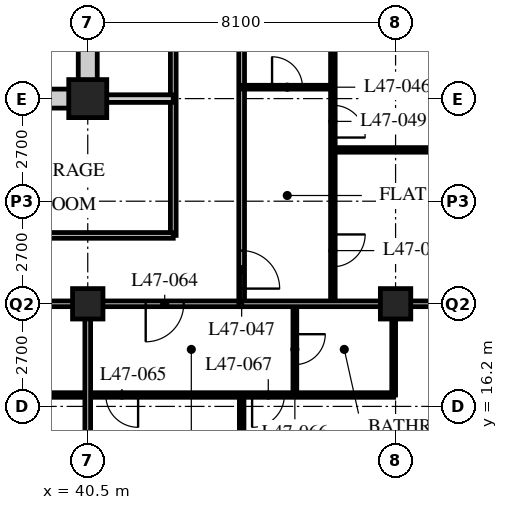
"""IFC4 building model, lengths in metres.
Left out: names, types, materials, properties, quantities, classifications, styles, units other than length and angle.
Written with IfcOpenShell. Run it as: python <this file> out.ifc"""

import sys

from ifc_helpers import new_model, si_unit, direction, frame, frame_2d, origin, origin_2d, place, context, subcontext, project, spatial, rectangle, hollow_rectangle, extrude, element, fill, save


model = new_model("IFC4")
c1 = context("Model", 3, precision=1e-05, world=origin(), true_north=direction((0.0, 1.0)))
c2 = subcontext(c1, "Body", "Model", "MODEL_VIEW")
j1 = project(units=[si_unit("LENGTHUNIT", "METRE"), si_unit("PLANEANGLEUNIT", "RADIAN")], contexts=[c1])
p1 = place(None, origin())
s1 = spatial("IfcSite", under=j1, at=p1, CompositionType="ELEMENT")
p2 = place(p1, origin())
s2 = spatial("IfcBuilding", under=s1, at=p2, CompositionType="ELEMENT")
p3 = place(p2, frame((0.0, 0.0, 184.8)))
s3 = spatial("IfcBuildingStorey", under=s2, at=p3, CompositionType="ELEMENT", Elevation=184.8)
p4 = place(p3, frame((40.5, 18.9, 0.0), z_axis=(0.0, 0.0, 1.0), x_axis=(1.0, 0.0, 0.0)))
e1 = element("IfcColumn", 1, at=p4, inside=s3, PredefinedType="COLUMN", context=c2, shape_type="SweptSolid", body=[
    extrude(hollow_rectangle(XDim=0.8, YDim=0.8, WallThickness=0.08, at=origin_2d()), origin(), (0.0, 0.0, 1.0), 3.6),
])
p5 = place(p3, frame((40.5, 24.3, 0.0), z_axis=(0.0, 0.0, 1.0), x_axis=(1.0, 0.0, 0.0)))
e2 = element("IfcColumn", 2, at=p5, inside=s3, PredefinedType="COLUMN", context=c2, shape_type="SweptSolid", body=[
    extrude(hollow_rectangle(XDim=1.0, YDim=1.0, WallThickness=0.1, at=origin_2d()), origin(), (0.0, 0.0, 1.0), 3.6),
])
p6 = place(p3, frame((48.6, 18.9, 0.0), z_axis=(0.0, 0.0, 1.0), x_axis=(1.0, 0.0, 0.0)))
e3 = element("IfcColumn", 3, at=p6, inside=s3, PredefinedType="COLUMN", context=c2, shape_type="SweptSolid", body=[
    extrude(hollow_rectangle(XDim=0.8, YDim=0.8, WallThickness=0.08, at=origin_2d()), origin(), (0.0, 0.0, 1.0), 3.6),
])
p7 = place(p3, frame((12.15, 18.9, 0.0), z_axis=(0.0, 0.0, 1.0), x_axis=(1.0, 0.0, 0.0)))
e4 = element("IfcWall", 4, at=p7, inside=s3, PredefinedType="PARTITIONING", context=c2, shape_type="SweptSolid", body=[
    extrude(rectangle(XDim=32.4, YDim=0.15, at=frame_2d((16.2, 0.0))), origin(), (0.0, 0.0, 1.0), 2.778),
])
p8 = place(p7, frame((4.95, 0.0, 0.0)))
e5 = element("IfcOpeningElement", 5, at=p8, cuts=e4, PredefinedType="OPENING", context=c2, shape_type="SweptSolid", body=[
    extrude(rectangle(XDim=1.0, YDim=2.1, at=frame_2d((0.5, 1.05))), frame((0.0, 0.085, 0.0), z_axis=(0.0, -1.0, 0.0), x_axis=(1.0, 0.0, 0.0)), (0.0, 0.0, 1.0), 0.17),
])
p9 = place(p7, frame((13.05, 0.0, 0.0)))
e6 = element("IfcOpeningElement", 6, at=p9, cuts=e4, PredefinedType="OPENING", context=c2, shape_type="SweptSolid", body=[
    extrude(rectangle(XDim=1.0, YDim=2.1, at=frame_2d((0.5, 1.05))), frame((0.0, 0.085, 0.0), z_axis=(0.0, -1.0, 0.0), x_axis=(1.0, 0.0, 0.0)), (0.0, 0.0, 1.0), 0.17),
])
p10 = place(p7, frame((21.15, 0.0, 0.0)))
e7 = element("IfcOpeningElement", 7, at=p10, cuts=e4, PredefinedType="OPENING", context=c2, shape_type="SweptSolid", body=[
    extrude(rectangle(XDim=1.0, YDim=2.1, at=frame_2d((0.5, 1.05))), frame((0.0, 0.085, 0.0), z_axis=(0.0, -1.0, 0.0), x_axis=(1.0, 0.0, 0.0)), (0.0, 0.0, 1.0), 0.17),
])
p11 = place(p7, frame((1.525, 0.0, 0.0)))
e8 = element("IfcOpeningElement", 8, at=p11, cuts=e4, PredefinedType="OPENING", context=c2, shape_type="SweptSolid", body=[
    extrude(rectangle(XDim=1.0, YDim=2.1, at=frame_2d((0.5, 1.05))), frame((0.0, 0.085, 0.0), z_axis=(0.0, -1.0, 0.0), x_axis=(1.0, 0.0, 0.0)), (0.0, 0.0, 1.0), 0.17),
])
p12 = place(p7, frame((29.875, 0.0, 0.0)))
e9 = element("IfcOpeningElement", 9, at=p12, cuts=e4, PredefinedType="OPENING", context=c2, shape_type="SweptSolid", body=[
    extrude(rectangle(XDim=1.0, YDim=2.1, at=frame_2d((0.5, 1.05))), frame((0.0, 0.085, 0.0), z_axis=(0.0, -1.0, 0.0), x_axis=(1.0, 0.0, 0.0)), (0.0, 0.0, 1.0), 0.17),
])
p13 = place(p3, frame((44.55, 18.9, 0.0), z_axis=(0.0, 0.0, 1.0), x_axis=(0.0, 1.0, 0.0)))
e10 = element("IfcWall", 10, at=p13, inside=s3, PredefinedType="PARTITIONING", context=c2, shape_type="SweptSolid", body=[
    extrude(rectangle(XDim=28.35, YDim=0.15, at=frame_2d((14.175, 0.0))), origin(), (0.0, 0.0, 1.0), 3.39),
])
p14 = place(p13, frame((0.4, 0.0, 0.0)))
e11 = element("IfcOpeningElement", 11, at=p14, cuts=e10, PredefinedType="OPENING", context=c2, shape_type="SweptSolid", body=[
    extrude(rectangle(XDim=1.0, YDim=2.1, at=frame_2d((0.5, 1.05))), frame((0.0, 0.085, 0.0), z_axis=(0.0, -1.0, 0.0), x_axis=(1.0, 0.0, 0.0)), (0.0, 0.0, 1.0), 0.17),
])
p15 = place(p13, frame((10.45, 0.0, 0.0)))
e12 = element("IfcOpeningElement", 12, at=p15, cuts=e10, PredefinedType="OPENING", context=c2, shape_type="SweptSolid", body=[
    extrude(rectangle(XDim=1.0, YDim=2.1, at=frame_2d((0.5, 1.05))), frame((0.0, 0.085, 0.0), z_axis=(0.0, -1.0, 0.0), x_axis=(1.0, 0.0, 0.0)), (0.0, 0.0, 1.0), 0.17),
])
p16 = place(p13, frame((14.5, 0.0, 0.0)))
e13 = element("IfcOpeningElement", 13, at=p16, cuts=e10, PredefinedType="OPENING", context=c2, shape_type="SweptSolid", body=[
    extrude(rectangle(XDim=1.0, YDim=2.1, at=frame_2d((0.5, 1.05))), frame((0.0, 0.085, 0.0), z_axis=(0.0, -1.0, 0.0), x_axis=(1.0, 0.0, 0.0)), (0.0, 0.0, 1.0), 0.17),
])
p17 = place(p13, frame((16.6, 0.0, 0.0)))
e14 = element("IfcOpeningElement", 14, at=p17, cuts=e10, PredefinedType="OPENING", context=c2, shape_type="SweptSolid", body=[
    extrude(rectangle(XDim=1.0, YDim=2.1, at=frame_2d((0.5, 1.05))), frame((0.0, 0.085, 0.0), z_axis=(0.0, -1.0, 0.0), x_axis=(1.0, 0.0, 0.0)), (0.0, 0.0, 1.0), 0.17),
])
p18 = place(p13, frame((26.65, 0.0, 0.0)))
e15 = element("IfcOpeningElement", 15, at=p18, cuts=e10, PredefinedType="OPENING", context=c2, shape_type="SweptSolid", body=[
    extrude(rectangle(XDim=1.0, YDim=2.1, at=frame_2d((0.5, 1.05))), frame((0.0, 0.085, 0.0), z_axis=(0.0, -1.0, 0.0), x_axis=(1.0, 0.0, 0.0)), (0.0, 0.0, 1.0), 0.17),
])
p19 = place(p3, frame((42.75, 20.7, 0.0), z_axis=(0.0, 0.0, 1.0), x_axis=(0.0, 1.0, 0.0)))
e16 = element("IfcWall", 16, at=p19, inside=s3, PredefinedType="PARTITIONING", context=c2, shape_type="SweptSolid", body=[
    extrude(rectangle(XDim=24.75, YDim=0.15, at=frame_2d((12.375, 0.0))), origin(), (0.0, 0.0, 1.0), 3.39),
])
p20 = place(p19, frame((7.15, 0.0, 0.0)))
e17 = element("IfcOpeningElement", 17, at=p20, cuts=e16, PredefinedType="OPENING", context=c2, shape_type="SweptSolid", body=[
    extrude(rectangle(XDim=1.0, YDim=2.1, at=frame_2d((0.5, 1.05))), frame((0.0, 0.085, 0.0), z_axis=(0.0, -1.0, 0.0), x_axis=(1.0, 0.0, 0.0)), (0.0, 0.0, 1.0), 0.17),
])
p21 = place(p19, frame((15.25, 0.0, 0.0)))
e18 = element("IfcOpeningElement", 18, at=p21, cuts=e16, PredefinedType="OPENING", context=c2, shape_type="SweptSolid", body=[
    extrude(rectangle(XDim=1.0, YDim=2.1, at=frame_2d((0.5, 1.05))), frame((0.0, 0.085, 0.0), z_axis=(0.0, -1.0, 0.0), x_axis=(1.0, 0.0, 0.0)), (0.0, 0.0, 1.0), 0.17),
])
p22 = place(p3, frame((29.56, 20.7, 0.0), z_axis=(0.0, 0.0, 1.0), x_axis=(1.0, 0.0, 0.0)))
e19 = element("IfcWall", 19, at=p22, inside=s3, PredefinedType="PARTITIONING", context=c2, shape_type="SweptSolid", body=[
    extrude(rectangle(XDim=13.19, YDim=0.15, at=frame_2d((6.595, 0.0))), origin(), (0.0, 0.0, 1.0), 3.39),
])
p23 = place(p22, frame((0.462, 0.0, 0.0)))
e20 = element("IfcOpeningElement", 20, at=p23, cuts=e19, PredefinedType="OPENING", context=c2, shape_type="SweptSolid", body=[
    extrude(rectangle(XDim=1.0, YDim=2.1, at=frame_2d((0.5, 1.05))), frame((0.0, 0.085, 0.0), z_axis=(0.0, -1.0, 0.0), x_axis=(1.0, 0.0, 0.0)), (0.0, 0.0, 1.0), 0.17),
])
p24 = place(p22, frame((7.062, 0.0, 0.0)))
e21 = element("IfcOpeningElement", 21, at=p24, cuts=e19, PredefinedType="OPENING", context=c2, shape_type="SweptSolid", body=[
    extrude(rectangle(XDim=1.0, YDim=2.1, at=frame_2d((0.5, 1.05))), frame((0.0, 0.085, 0.0), z_axis=(0.0, -1.0, 0.0), x_axis=(1.0, 0.0, 0.0)), (0.0, 0.0, 1.0), 0.17),
])
p25 = place(p3, frame((40.5, 24.3, 0.0), z_axis=(0.0, 0.0, 1.0), x_axis=(1.0, 0.0, 0.0)))
e22 = element("IfcWall", 22, at=p25, inside=s3, PredefinedType="SOLIDWALL", context=c2, shape_type="SweptSolid", body=[
    extrude(rectangle(XDim=2.25, YDim=0.2, at=frame_2d((1.125, 0.0))), origin(), (0.0, 0.0, 1.0), 3.39),
])
p26 = place(p3, frame((46.95, 18.9, 0.0), z_axis=(0.0, 0.0, 1.0), x_axis=(0.0, 1.0, 0.0)))
e23 = element("IfcWall", 23, at=p26, inside=s3, PredefinedType="PARTITIONING", context=c2, shape_type="SweptSolid", body=[
    extrude(rectangle(XDim=8.1, YDim=0.12, at=frame_2d((4.05, 0.0))), origin(), (0.0, 0.0, 1.0), 3.39),
])
p27 = place(p26, frame((0.975, 0.0, 0.0)))
e24 = element("IfcOpeningElement", 24, at=p27, cuts=e23, PredefinedType="OPENING", context=c2, shape_type="SweptSolid", body=[
    extrude(rectangle(XDim=0.85, YDim=2.1, at=frame_2d((0.425, 1.05))), frame((0.0, 0.07, 0.0), z_axis=(0.0, -1.0, 0.0), x_axis=(1.0, 0.0, 0.0)), (0.0, 0.0, 1.0), 0.14),
])
p28 = place(p26, frame((4.375, 0.0, 0.0)))
e25 = element("IfcOpeningElement", 25, at=p28, cuts=e23, PredefinedType="OPENING", context=c2, shape_type="SweptSolid", body=[
    extrude(rectangle(XDim=0.85, YDim=2.1, at=frame_2d((0.425, 1.05))), frame((0.0, 0.07, 0.0), z_axis=(0.0, -1.0, 0.0), x_axis=(1.0, 0.0, 0.0)), (0.0, 0.0, 1.0), 0.14),
])
p29 = place(p3, frame((44.55, 24.6, 0.0), z_axis=(0.0, 0.0, 1.0), x_axis=(1.0, 0.0, 0.0)))
e26 = element("IfcWall", 26, at=p29, inside=s3, PredefinedType="PARTITIONING", context=c2, shape_type="SweptSolid", body=[
    extrude(rectangle(XDim=2.4, YDim=0.1, at=frame_2d((1.2, 0.0))), origin(), (0.0, 0.0, 1.0), 3.39),
])
p30 = place(p29, frame((0.8, 0.0, 0.0)))
e27 = element("IfcOpeningElement", 27, at=p30, cuts=e26, PredefinedType="OPENING", context=c2, shape_type="SweptSolid", body=[
    extrude(rectangle(XDim=0.8, YDim=2.1, at=frame_2d((0.4, 1.05))), frame((0.0, 0.06, 0.0), z_axis=(0.0, -1.0, 0.0), x_axis=(1.0, 0.0, 0.0)), (0.0, 0.0, 1.0), 0.12),
])
p31 = place(p3, frame((46.95, 22.95, 0.0), z_axis=(0.0, 0.0, 1.0), x_axis=(1.0, 0.0, 0.0)))
e28 = element("IfcWall", 28, at=p31, inside=s3, PredefinedType="PARTITIONING", context=c2, shape_type="SweptSolid", body=[
    extrude(rectangle(XDim=9.45, YDim=0.12, at=frame_2d((4.725, 0.0))), origin(), (0.0, 0.0, 1.0), 3.39),
])
p32 = place(p3, frame((8.15, 16.5, 0.0), z_axis=(0.0, 0.0, 1.0), x_axis=(1.0, 0.0, 0.0)))
e29 = element("IfcWall", 29, at=p32, inside=s3, PredefinedType="PARTITIONING", context=c2, shape_type="SweptSolid", body=[
    extrude(rectangle(XDim=40.4, YDim=0.12, at=frame_2d((20.2, 0.0))), origin(), (0.0, 0.0, 1.0), 3.39),
])
p33 = place(p32, frame((9.025, 0.0, 0.0)))
e30 = element("IfcOpeningElement", 30, at=p33, cuts=e29, PredefinedType="OPENING", context=c2, shape_type="SweptSolid", body=[
    extrude(rectangle(XDim=0.85, YDim=2.1, at=frame_2d((0.425, 1.05))), frame((0.0, 0.07, 0.0), z_axis=(0.0, -1.0, 0.0), x_axis=(1.0, 0.0, 0.0)), (0.0, 0.0, 1.0), 0.14),
])
p34 = place(p32, frame((12.425, 0.0, 0.0)))
e31 = element("IfcOpeningElement", 31, at=p34, cuts=e29, PredefinedType="OPENING", context=c2, shape_type="SweptSolid", body=[
    extrude(rectangle(XDim=0.85, YDim=2.1, at=frame_2d((0.425, 1.05))), frame((0.0, 0.07, 0.0), z_axis=(0.0, -1.0, 0.0), x_axis=(1.0, 0.0, 0.0)), (0.0, 0.0, 1.0), 0.14),
])
p35 = place(p32, frame((17.125, 0.0, 0.0)))
e32 = element("IfcOpeningElement", 32, at=p35, cuts=e29, PredefinedType="OPENING", context=c2, shape_type="SweptSolid", body=[
    extrude(rectangle(XDim=0.85, YDim=2.1, at=frame_2d((0.425, 1.05))), frame((0.0, 0.07, 0.0), z_axis=(0.0, -1.0, 0.0), x_axis=(1.0, 0.0, 0.0)), (0.0, 0.0, 1.0), 0.14),
])
p36 = place(p32, frame((20.525, 0.0, 0.0)))
e33 = element("IfcOpeningElement", 33, at=p36, cuts=e29, PredefinedType="OPENING", context=c2, shape_type="SweptSolid", body=[
    extrude(rectangle(XDim=0.85, YDim=2.1, at=frame_2d((0.425, 1.05))), frame((0.0, 0.07, 0.0), z_axis=(0.0, -1.0, 0.0), x_axis=(1.0, 0.0, 0.0)), (0.0, 0.0, 1.0), 0.14),
])
p37 = place(p32, frame((25.225, 0.0, 0.0)))
e34 = element("IfcOpeningElement", 34, at=p37, cuts=e29, PredefinedType="OPENING", context=c2, shape_type="SweptSolid", body=[
    extrude(rectangle(XDim=0.85, YDim=2.1, at=frame_2d((0.425, 1.05))), frame((0.0, 0.07, 0.0), z_axis=(0.0, -1.0, 0.0), x_axis=(1.0, 0.0, 0.0)), (0.0, 0.0, 1.0), 0.14),
])
p38 = place(p32, frame((28.625, 0.0, 0.0)))
e35 = element("IfcOpeningElement", 35, at=p38, cuts=e29, PredefinedType="OPENING", context=c2, shape_type="SweptSolid", body=[
    extrude(rectangle(XDim=0.85, YDim=2.1, at=frame_2d((0.425, 1.05))), frame((0.0, 0.07, 0.0), z_axis=(0.0, -1.0, 0.0), x_axis=(1.0, 0.0, 0.0)), (0.0, 0.0, 1.0), 0.14),
])
p39 = place(p32, frame((6.725, 0.0, 0.0)))
e36 = element("IfcOpeningElement", 36, at=p39, cuts=e29, PredefinedType="OPENING", context=c2, shape_type="SweptSolid", body=[
    extrude(rectangle(XDim=0.85, YDim=2.1, at=frame_2d((0.425, 1.05))), frame((0.0, 0.07, 0.0), z_axis=(0.0, -1.0, 0.0), x_axis=(1.0, 0.0, 0.0)), (0.0, 0.0, 1.0), 0.14),
])
p40 = place(p32, frame((2.875, 0.0, 0.0)))
e37 = element("IfcOpeningElement", 37, at=p40, cuts=e29, PredefinedType="OPENING", context=c2, shape_type="SweptSolid", body=[
    extrude(rectangle(XDim=0.85, YDim=2.1, at=frame_2d((0.425, 1.05))), frame((0.0, 0.07, 0.0), z_axis=(0.0, -1.0, 0.0), x_axis=(1.0, 0.0, 0.0)), (0.0, 0.0, 1.0), 0.14),
])
p41 = place(p32, frame((32.825, 0.0, 0.0)))
e38 = element("IfcOpeningElement", 38, at=p41, cuts=e29, PredefinedType="OPENING", context=c2, shape_type="SweptSolid", body=[
    extrude(rectangle(XDim=0.85, YDim=2.1, at=frame_2d((0.425, 1.05))), frame((0.0, 0.07, 0.0), z_axis=(0.0, -1.0, 0.0), x_axis=(1.0, 0.0, 0.0)), (0.0, 0.0, 1.0), 0.14),
])
p42 = place(p32, frame((36.675, 0.0, 0.0)))
e39 = element("IfcOpeningElement", 39, at=p42, cuts=e29, PredefinedType="OPENING", context=c2, shape_type="SweptSolid", body=[
    extrude(rectangle(XDim=0.85, YDim=2.1, at=frame_2d((0.425, 1.05))), frame((0.0, 0.07, 0.0), z_axis=(0.0, -1.0, 0.0), x_axis=(1.0, 0.0, 0.0)), (0.0, 0.0, 1.0), 0.14),
])
p43 = place(p3, frame((45.95, 18.9, 0.0), z_axis=(0.0, 0.0, 1.0), x_axis=(0.0, -1.0, 0.0)))
e40 = element("IfcWall", 40, at=p43, inside=s3, PredefinedType="PARTITIONING", context=c2, shape_type="SweptSolid", body=[
    extrude(rectangle(XDim=2.4, YDim=0.1, at=frame_2d((1.2, 0.0))), origin(), (0.0, 0.0, 1.0), 3.39),
])
p44 = place(p43, frame((0.8, 0.0, 0.0)))
e41 = element("IfcOpeningElement", 41, at=p44, cuts=e40, PredefinedType="OPENING", context=c2, shape_type="SweptSolid", body=[
    extrude(rectangle(XDim=0.8, YDim=2.1, at=frame_2d((0.4, 1.05))), frame((0.0, 0.06, 0.0), z_axis=(0.0, -1.0, 0.0), x_axis=(1.0, 0.0, 0.0)), (0.0, 0.0, 1.0), 0.12),
])
p45 = place(p3, frame((48.55, 18.9, 0.0), z_axis=(0.0, 0.0, 1.0), x_axis=(0.0, -1.0, 0.0)))
e42 = element("IfcWall", 42, at=p45, inside=s3, PredefinedType="PARTITIONING", context=c2, shape_type="SweptSolid", body=[
    extrude(rectangle(XDim=2.4, YDim=0.1, at=frame_2d((1.2, 0.0))), origin(), (0.0, 0.0, 1.0), 2.778),
])
p46 = place(p3, frame((44.55, 16.5, 0.0), z_axis=(0.0, 0.0, 1.0), x_axis=(0.0, -1.0, 0.0)))
e43 = element("IfcWall", 43, at=p46, inside=s3, PredefinedType="PARTITIONING", context=c2, shape_type="SweptSolid", body=[
    extrude(rectangle(XDim=5.4, YDim=0.12, at=frame_2d((2.7, 0.0))), origin(), (0.0, 0.0, 1.0), 3.39),
])
p47 = place(p3, frame((44.55, 18.9, 0.0), z_axis=(0.0, 0.0, 1.0), x_axis=(1.0, 0.0, 0.0)))
e44 = element("IfcWall", 44, at=p47, inside=s3, PredefinedType="PARTITIONING", context=c2, shape_type="SweptSolid", body=[
    extrude(rectangle(XDim=7.8, YDim=0.15, at=frame_2d((3.9, 0.0))), origin(), (0.0, 0.0, 1.0), 2.778),
])
p48 = place(p3, frame((40.5, 18.9, 0.0), z_axis=(0.0, 0.0, 1.0), x_axis=(0.0, -1.0, 0.0)))
e45 = element("IfcWall", 45, at=p48, inside=s3, PredefinedType="PARTITIONING", context=c2, shape_type="SweptSolid", body=[
    extrude(rectangle(XDim=7.8, YDim=0.15, at=frame_2d((3.9, 0.0))), origin(), (0.0, 0.0, 1.0), 2.778),
])
p49 = place(p3, frame((15.95, 24.3, 0.0), z_axis=(0.0, 0.0, 1.0), x_axis=(1.0, 0.0, 0.0)))
e46 = element("IfcWall", 46, at=p49, inside=s3, PredefinedType="SOLIDWALL", context=c2, shape_type="SweptSolid", body=[
    extrude(rectangle(XDim=24.8, YDim=0.5, at=frame_2d((12.4, 0.0))), origin(), (0.0, 0.0, 1.0), 2.74),
])
p50 = place(p49, frame((11.5, 0.0, 0.0)))
e47 = element("IfcOpeningElement", 47, at=p50, cuts=e46, PredefinedType="OPENING", context=c2, shape_type="SweptSolid", body=[
    extrude(rectangle(XDim=1.8, YDim=2.4, at=frame_2d((0.9, 1.2))), frame((0.0, 0.26, 0.0), z_axis=(0.0, -1.0, 0.0), x_axis=(1.0, 0.0, 0.0)), (0.0, 0.0, 1.0), 0.52),
])
p51 = place(p3, frame((40.5, 24.55, 0.0), z_axis=(0.0, 0.0, 1.0), x_axis=(0.0, 1.0, 0.0)))
e48 = element("IfcWall", 48, at=p51, inside=s3, PredefinedType="SOLIDWALL", context=c2, shape_type="SweptSolid", body=[
    extrude(rectangle(XDim=15.7, YDim=0.5, at=frame_2d((7.85, 0.0))), origin(), (0.0, 0.0, 1.0), 2.778),
])
p52 = place(p30, origin())
e49 = element("IfcDoor", 49, at=p52, inside=s3, OperationType="SINGLE_SWING_LEFT", PredefinedType="DOOR", context=c2, shape_type="SweptSolid", body=[
    extrude(rectangle(XDim=0.8, YDim=2.1, at=frame_2d((0.4, 1.05))), frame((0.0, 0.025, 0.0), z_axis=(0.0, -1.0, 0.0), x_axis=(1.0, 0.0, 0.0)), (0.0, 0.0, 1.0), 0.05),
])
fill(e27, e49)
p53 = place(p14, origin())
e50 = element("IfcDoor", 50, at=p53, inside=s3, OperationType="SINGLE_SWING_RIGHT", PredefinedType="DOOR", context=c2, shape_type="SweptSolid", body=[
    extrude(rectangle(XDim=1.0, YDim=2.1, at=frame_2d((0.5, 1.05))), frame((0.0, 0.025, 0.0), z_axis=(0.0, -1.0, 0.0), x_axis=(1.0, 0.0, 0.0)), (0.0, 0.0, 1.0), 0.05),
])
fill(e11, e50)
p54 = place(p27, origin())
e51 = element("IfcDoor", 51, at=p54, inside=s3, OperationType="SINGLE_SWING_LEFT", PredefinedType="DOOR", context=c2, shape_type="SweptSolid", body=[
    extrude(rectangle(XDim=0.85, YDim=2.1, at=frame_2d((0.425, 1.05))), frame((0.0, 0.025, 0.0), z_axis=(0.0, -1.0, 0.0), x_axis=(1.0, 0.0, 0.0)), (0.0, 0.0, 1.0), 0.05),
])
fill(e24, e51)
p55 = place(p28, origin())
e52 = element("IfcDoor", 52, at=p55, inside=s3, OperationType="SINGLE_SWING_RIGHT", PredefinedType="DOOR", context=c2, shape_type="SweptSolid", body=[
    extrude(rectangle(XDim=0.85, YDim=2.1, at=frame_2d((0.425, 1.05))), frame((0.0, 0.025, 0.0), z_axis=(0.0, -1.0, 0.0), x_axis=(1.0, 0.0, 0.0)), (0.0, 0.0, 1.0), 0.05),
])
fill(e25, e52)
p56 = place(p12, origin())
e53 = element("IfcDoor", 53, at=p56, inside=s3, OperationType="SINGLE_SWING_RIGHT", PredefinedType="DOOR", context=c2, shape_type="SweptSolid", body=[
    extrude(rectangle(XDim=1.0, YDim=2.1, at=frame_2d((0.5, 1.05))), frame((0.0, 0.025, 0.0), z_axis=(0.0, -1.0, 0.0), x_axis=(1.0, 0.0, 0.0)), (0.0, 0.0, 1.0), 0.05),
])
fill(e9, e53)
p57 = place(p41, origin())
e54 = element("IfcDoor", 54, at=p57, inside=s3, OperationType="SINGLE_SWING_LEFT", PredefinedType="DOOR", context=c2, shape_type="SweptSolid", body=[
    extrude(rectangle(XDim=0.85, YDim=2.1, at=frame_2d((0.425, 1.05))), frame((0.0, 0.025, 0.0), z_axis=(0.0, -1.0, 0.0), x_axis=(1.0, 0.0, 0.0)), (0.0, 0.0, 1.0), 0.05),
])
fill(e38, e54)
p58 = place(p44, origin())
e55 = element("IfcDoor", 55, at=p58, inside=s3, OperationType="SINGLE_SWING_LEFT", PredefinedType="DOOR", context=c2, shape_type="SweptSolid", body=[
    extrude(rectangle(XDim=0.8, YDim=2.1, at=frame_2d((0.4, 1.05))), frame((0.0, 0.025, 0.0), z_axis=(0.0, -1.0, 0.0), x_axis=(1.0, 0.0, 0.0)), (0.0, 0.0, 1.0), 0.05),
])
fill(e41, e55)
p59 = place(p42, origin())
e56 = element("IfcDoor", 56, at=p59, inside=s3, OperationType="SINGLE_SWING_RIGHT", PredefinedType="DOOR", context=c2, shape_type="SweptSolid", body=[
    extrude(rectangle(XDim=0.85, YDim=2.1, at=frame_2d((0.425, 1.05))), frame((0.0, 0.025, 0.0), z_axis=(0.0, -1.0, 0.0), x_axis=(1.0, 0.0, 0.0)), (0.0, 0.0, 1.0), 0.05),
])
fill(e39, e56)
save(model, sys.argv[1])
